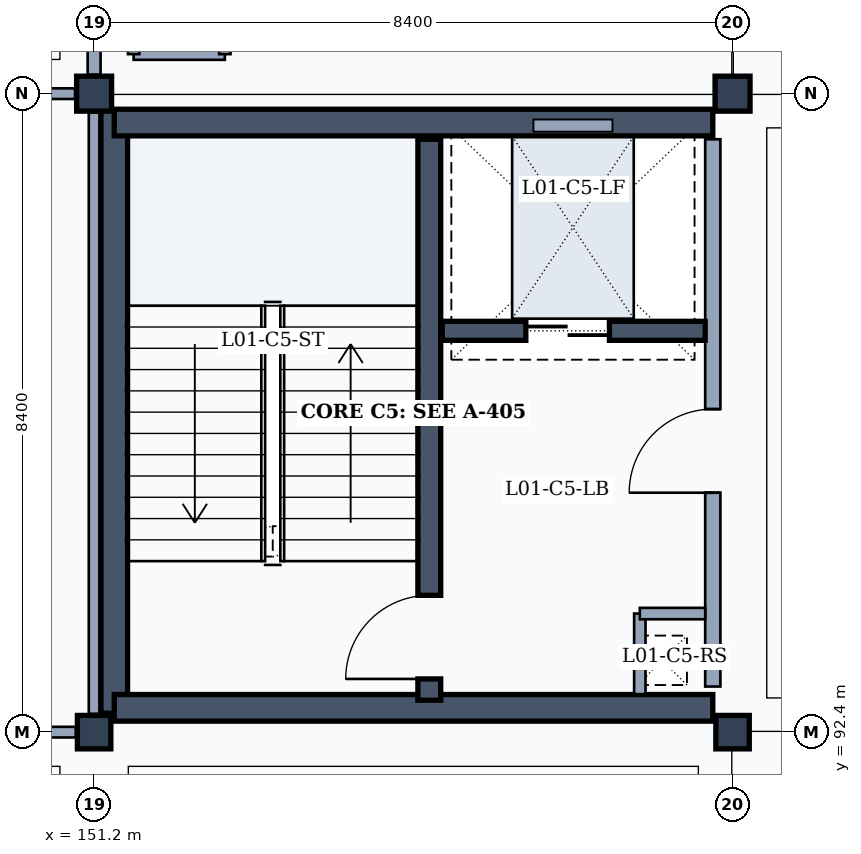
"""IFC4 building model, lengths in metres.
Left out: names, types, materials, properties, quantities, classifications, styles, units other than length and angle.
Written with IfcOpenShell. Run it as: python <this file> out.ifc"""

import sys

from ifc_helpers import new_model, si_unit, direction, frame, frame_2d, origin, origin_2d, place, context, subcontext, project, spatial, rectangle, extrude, element, fill, save


model = new_model("IFC4")
c1 = context("Model", 3, precision=1e-05, world=origin(), true_north=direction((0.0, 1.0)))
c2 = subcontext(c1, "Body", "Model", "MODEL_VIEW")
j1 = project(units=[si_unit("LENGTHUNIT", "METRE"), si_unit("PLANEANGLEUNIT", "RADIAN")], contexts=[c1])
p1 = place(None, origin())
s1 = spatial("IfcSite", under=j1, at=p1, CompositionType="ELEMENT")
p2 = place(p1, origin())
s2 = spatial("IfcBuilding", under=s1, at=p2, CompositionType="ELEMENT")
p3 = place(p2, frame((0.0, 0.0, 4.8)))
s3 = spatial("IfcBuildingStorey", under=s2, at=p3, CompositionType="ELEMENT", Elevation=4.8)
p4 = place(p3, frame((151.2, 92.4, 0.0), z_axis=(0.0, 0.0, 1.0), x_axis=(1.0, 0.0, 0.0)))
e1 = element("IfcColumn", 1, at=p4, inside=s3, PredefinedType="COLUMN", context=c2, shape_type="SweptSolid", body=[
    extrude(rectangle(XDim=0.44, YDim=0.44, at=origin_2d()), origin(), (0.0, 0.0, 1.0), 4.8),
])
p5 = place(p3, frame((151.2, 100.8, 0.0), z_axis=(0.0, 0.0, 1.0), x_axis=(1.0, 0.0, 0.0)))
e2 = element("IfcColumn", 2, at=p5, inside=s3, PredefinedType="COLUMN", context=c2, shape_type="SweptSolid", body=[
    extrude(rectangle(XDim=0.46, YDim=0.46, at=origin_2d()), origin(), (0.0, 0.0, 1.0), 4.8),
])
p6 = place(p3, frame((159.6, 92.4, 0.0), z_axis=(0.0, 0.0, 1.0), x_axis=(1.0, 0.0, 0.0)))
e3 = element("IfcColumn", 3, at=p6, inside=s3, PredefinedType="COLUMN", context=c2, shape_type="SweptSolid", body=[
    extrude(rectangle(XDim=0.44, YDim=0.44, at=origin_2d()), origin(), (0.0, 0.0, 1.0), 4.8),
])
p7 = place(p3, frame((159.6, 100.8, 0.0), z_axis=(0.0, 0.0, 1.0), x_axis=(1.0, 0.0, 0.0)))
e4 = element("IfcColumn", 4, at=p7, inside=s3, PredefinedType="COLUMN", context=c2, shape_type="SweptSolid", body=[
    extrude(rectangle(XDim=0.46, YDim=0.46, at=origin_2d()), origin(), (0.0, 0.0, 1.0), 4.8),
])
p8 = place(p3, frame((151.465, 92.65, 0.0), z_axis=(0.0, 0.0, 1.0), x_axis=(0.0, 1.0, 0.0)))
e5 = element("IfcWall", 5, at=p8, inside=s3, PredefinedType="SHEAR", context=c2, shape_type="SweptSolid", body=[
    extrude(rectangle(XDim=7.94, YDim=0.35, at=frame_2d((3.97, 0.0))), origin(), (0.0, 0.0, 1.0), 4.55),
])
p9 = place(p3, frame((151.465, 100.42, 0.0), z_axis=(0.0, 0.0, 1.0), x_axis=(1.0, 0.0, 0.0)))
e6 = element("IfcWall", 6, at=p9, inside=s3, PredefinedType="SHEAR", context=c2, shape_type="SweptSolid", body=[
    extrude(rectangle(XDim=7.875, YDim=0.35, at=frame_2d((3.938, 0.0))), origin(), (0.0, 0.0, 1.0), 4.55),
])
p10 = place(p3, frame((159.34, 100.2, 0.0), z_axis=(0.0, 0.0, 1.0), x_axis=(0.0, -1.0, 0.0)))
e7 = element("IfcWall", 7, at=p10, inside=s3, PredefinedType="PARTITIONING", context=c2, shape_type="SweptSolid", body=[
    extrude(rectangle(XDim=7.2, YDim=0.2, at=frame_2d((3.6, 0.0))), origin(), (0.0, 0.0, 1.0), 3.92),
])
p11 = place(p10, frame((3.55, 0.0, 0.0)))
e8 = element("IfcOpeningElement", 8, at=p11, cuts=e7, PredefinedType="OPENING", context=c2, shape_type="SweptSolid", body=[
    extrude(rectangle(XDim=1.1, YDim=2.15, at=frame_2d((0.55, 1.075))), frame((0.0, 0.11, 0.0), z_axis=(0.0, -1.0, 0.0), x_axis=(1.0, 0.0, 0.0)), (0.0, 0.0, 1.0), 0.22),
])
p12 = place(p3, frame((159.34, 92.72, 0.0), z_axis=(0.0, 0.0, 1.0), x_axis=(-1.0, 0.0, 0.0)))
e9 = element("IfcWall", 9, at=p12, inside=s3, PredefinedType="SHEAR", context=c2, shape_type="SweptSolid", body=[
    extrude(rectangle(XDim=7.875, YDim=0.35, at=frame_2d((3.938, 0.0))), origin(), (0.0, 0.0, 1.0), 4.55),
])
p13 = place(p3, frame((155.61, 92.82, 0.0), z_axis=(0.0, 0.0, 1.0), x_axis=(0.0, 1.0, 0.0)))
e10 = element("IfcWall", 10, at=p13, inside=s3, PredefinedType="SHEAR", context=c2, shape_type="SweptSolid", body=[
    extrude(rectangle(XDim=7.38, YDim=0.3, at=frame_2d((3.69, 0.0))), origin(), (0.0, 0.0, 1.0), 4.55),
])
p14 = place(p13, frame((0.28, 0.0, 0.0)))
e11 = element("IfcOpeningElement", 11, at=p14, cuts=e10, PredefinedType="OPENING", context=c2, shape_type="SweptSolid", body=[
    extrude(rectangle(XDim=1.1, YDim=2.15, at=frame_2d((0.55, 1.075))), frame((0.0, 0.16, 0.0), z_axis=(0.0, -1.0, 0.0), x_axis=(1.0, 0.0, 0.0)), (0.0, 0.0, 1.0), 0.32),
])
p15 = place(p3, frame((158.38, 93.96, 0.0), z_axis=(0.0, 0.0, 1.0), x_axis=(0.0, -1.0, 0.0)))
e12 = element("IfcWall", 12, at=p15, inside=s3, PredefinedType="PARTITIONING", context=c2, shape_type="SweptSolid", body=[
    extrude(rectangle(XDim=1.06, YDim=0.15, at=frame_2d((0.53, 0.0))), origin(), (0.0, 0.0, 1.0), 3.92),
])
p16 = place(p3, frame((158.38, 93.96, 0.0), z_axis=(0.0, 0.0, 1.0), x_axis=(1.0, 0.0, 0.0)))
e13 = element("IfcWall", 13, at=p16, inside=s3, PredefinedType="PARTITIONING", context=c2, shape_type="SweptSolid", body=[
    extrude(rectangle(XDim=0.86, YDim=0.15, at=frame_2d((0.43, 0.0))), origin(), (0.0, 0.0, 1.0), 3.92),
])
p17 = place(p3, frame((155.78, 97.68, 0.0), z_axis=(0.0, 0.0, 1.0), x_axis=(1.0, 0.0, 0.0)))
e14 = element("IfcWall", 14, at=p17, inside=s3, PredefinedType="SHEAR", context=c2, shape_type="SweptSolid", body=[
    extrude(rectangle(XDim=3.46, YDim=0.25, at=frame_2d((1.73, 0.0))), origin(), (0.0, 0.0, 1.0), 4.55),
])
p18 = place(p17, frame((1.1, 0.0, 0.0)))
e15 = element("IfcOpeningElement", 15, at=p18, cuts=e14, PredefinedType="OPENING", context=c2, shape_type="SweptSolid", body=[
    extrude(rectangle(XDim=1.1, YDim=2.15, at=frame_2d((0.55, 1.075))), frame((0.0, 0.135, 0.0), z_axis=(0.0, -1.0, 0.0), x_axis=(1.0, 0.0, 0.0)), (0.0, 0.0, 1.0), 0.27),
])
for number, where, z_axis, x_axis in (
    (16, (151.72, 101.32, 0.0), (0.0, 0.0, 1.0), (1.0, 0.0, 0.0)),
    (17, (152.92, 101.32, 0.0), (0.0, 0.0, 1.0), (0.0, 1.0, 0.0)),
    (18, (151.72, 102.52, 0.0), (0.0, 0.0, 1.0), (0.0, -1.0, 0.0)),
):
    element("IfcWall", number, at=place(p3, frame(where, z_axis=z_axis, x_axis=x_axis)), inside=s3, PredefinedType="PARTITIONING", context=c2, shape_type="SweptSolid", body=[
        extrude(rectangle(XDim=1.2, YDim=0.15, at=frame_2d((0.6, 0.0))), origin(), (0.0, 0.0, 1.0), 4.55),
    ])
p19 = place(p3, frame((143.04, 92.4, 0.0), z_axis=(0.0, 0.0, 1.0), x_axis=(1.0, 0.0, 0.0)))
e19 = element("IfcWall", 19, at=p19, inside=s3, PredefinedType="PARTITIONING", context=c2, shape_type="SweptSolid", body=[
    extrude(rectangle(XDim=7.92, YDim=0.14, at=frame_2d((3.96, 0.0))), origin(), (0.0, 0.0, 1.0), 3.92),
])
p20 = place(p19, frame((3.275, 0.0, 0.0)))
e20 = element("IfcOpeningElement", 20, at=p20, cuts=e19, PredefinedType="OPENING", context=c2, shape_type="SweptSolid", body=[
    extrude(rectangle(XDim=0.95, YDim=2.15, at=frame_2d((0.475, 1.075))), frame((0.0, 0.08, 0.0), z_axis=(0.0, -1.0, 0.0), x_axis=(1.0, 0.0, 0.0)), (0.0, 0.0, 1.0), 0.16),
])
p21 = place(p3, frame((151.2, 92.64, 0.0), z_axis=(0.0, 0.0, 1.0), x_axis=(0.0, 1.0, 0.0)))
e21 = element("IfcWall", 21, at=p21, inside=s3, PredefinedType="PARTITIONING", context=c2, shape_type="SweptSolid", body=[
    extrude(rectangle(XDim=7.91, YDim=0.14, at=frame_2d((3.955, 0.0))), origin(), (0.0, 0.0, 1.0), 3.92),
])
p22 = place(p3, frame((143.05, 100.8, 0.0), z_axis=(0.0, 0.0, 1.0), x_axis=(1.0, 0.0, 0.0)))
e22 = element("IfcWall", 22, at=p22, inside=s3, PredefinedType="PARTITIONING", context=c2, shape_type="SweptSolid", body=[
    extrude(rectangle(XDim=7.9, YDim=0.14, at=frame_2d((3.95, 0.0))), origin(), (0.0, 0.0, 1.0), 3.92),
])
p23 = place(p3, frame((151.2, 101.05, 0.0), z_axis=(0.0, 0.0, 1.0), x_axis=(0.0, 1.0, 0.0)))
e23 = element("IfcWall", 23, at=p23, inside=s3, PredefinedType="PARTITIONING", context=c2, shape_type="SweptSolid", body=[
    extrude(rectangle(XDim=7.91, YDim=0.17, at=frame_2d((3.955, 0.0))), origin(), (0.0, 0.0, 1.0), 3.92),
])
p24 = place(p23, frame((3.1, 0.0, 0.0)))
e24 = element("IfcOpeningElement", 24, at=p24, cuts=e23, PredefinedType="OPENING", context=c2, shape_type="SweptSolid", body=[
    extrude(rectangle(XDim=1.3, YDim=2.2, at=frame_2d((0.65, 1.1))), frame((0.0, 0.095, 0.0), z_axis=(0.0, -1.0, 0.0), x_axis=(1.0, 0.0, 0.0)), (0.0, 0.0, 1.0), 0.19),
])
p25 = place(p11, frame((1.1, 0.0, 0.0), z_axis=(0.0, 0.0, 1.0), x_axis=(-1.0, 0.0, 0.0)))
e25 = element("IfcDoor", 25, at=p25, inside=s3, OperationType="SINGLE_SWING_LEFT", PredefinedType="DOOR", context=c2, shape_type="SweptSolid", body=[
    extrude(rectangle(XDim=1.1, YDim=2.15, at=frame_2d((0.55, 1.075))), frame((0.0, 0.025, 0.0), z_axis=(0.0, -1.0, 0.0), x_axis=(1.0, 0.0, 0.0)), (0.0, 0.0, 1.0), 0.05),
])
fill(e8, e25)
p26 = place(p14, origin())
e26 = element("IfcDoor", 26, at=p26, inside=s3, OperationType="SINGLE_SWING_LEFT", PredefinedType="DOOR", context=c2, shape_type="SweptSolid", body=[
    extrude(rectangle(XDim=1.1, YDim=2.15, at=frame_2d((0.55, 1.075))), frame((0.0, 0.025, 0.0), z_axis=(0.0, -1.0, 0.0), x_axis=(1.0, 0.0, 0.0)), (0.0, 0.0, 1.0), 0.05),
])
fill(e11, e26)
p27 = place(p18, origin())
e27 = element("IfcDoor", 27, at=p27, inside=s3, OperationType="DOUBLE_DOOR_SLIDING", PredefinedType="DOOR", context=c2, shape_type="SweptSolid", body=[
    extrude(rectangle(XDim=1.1, YDim=2.15, at=frame_2d((0.55, 1.075))), frame((0.0, 0.025, 0.0), z_axis=(0.0, -1.0, 0.0), x_axis=(1.0, 0.0, 0.0)), (0.0, 0.0, 1.0), 0.05),
])
fill(e15, e27)
save(model, sys.argv[1])
